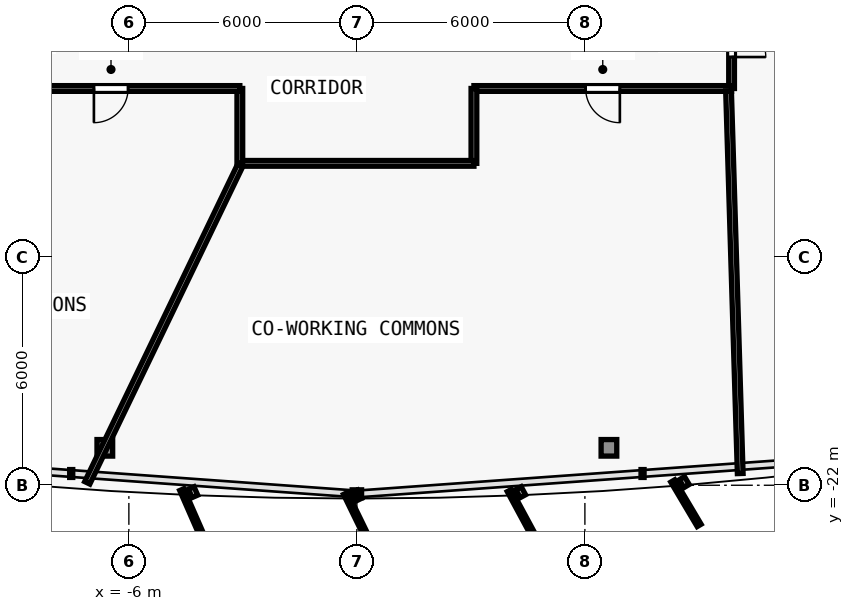
"""IFC4 building model, lengths in metres.
Left out: names, types, materials, properties, quantities, classifications, styles, units other than length and angle.
Written with IfcOpenShell. Run it as: python <this file> out.ifc"""

import sys

from ifc_helpers import new_model, si_unit, direction, frame, frame_2d, origin, origin_2d, place, context, subcontext, project, spatial, rectangle, i_section, extrude, element, fill, save


model = new_model("IFC4")
c1 = context("Model", 3, precision=1e-05, world=origin(), true_north=direction((0.0, 1.0)))
c2 = subcontext(c1, "Body", "Model", "MODEL_VIEW")
j1 = project(units=[si_unit("LENGTHUNIT", "METRE"), si_unit("PLANEANGLEUNIT", "RADIAN")], contexts=[c1])
p1 = place(None, origin())
s1 = spatial("IfcSite", under=j1, at=p1, CompositionType="ELEMENT")
p2 = place(p1, origin())
s2 = spatial("IfcBuilding", under=s1, at=p2, CompositionType="ELEMENT")
p3 = place(p2, frame((0.0, 0.0, 55.2)))
s3 = spatial("IfcBuildingStorey", under=s2, at=p3, CompositionType="ELEMENT", Elevation=55.2)
for number, where, z_axis, x_axis in (
    (1, (-6.633, -21.015, 0.006), (0.007, 0.035, 0.999), (-0.982, 0.191, 0.0)),
    (2, (6.633, -21.015, 0.006), (-0.007, 0.035, 0.999), (-0.982, -0.191, 0.0)),
):
    element("IfcColumn", number, at=place(p3, frame(where, z_axis=z_axis, x_axis=x_axis)), inside=s3, PredefinedType="COLUMN", context=c2, shape_type="SweptSolid", body=[
        extrude(i_section(OverallWidth=0.412, OverallDepth=0.435, WebThickness=0.023, FlangeThickness=0.037, FilletRadius=0.015, at=origin_2d()), origin(), (0.0, 0.0, 1.0), 3.591),
    ])
p4 = place(p3, frame((9.86, 8.426, 0.0), z_axis=(0.0, 0.0, 1.0), x_axis=(0.0, -1.0, 0.0)))
e3 = element("IfcWall", 3, at=p4, inside=s3, PredefinedType="PARTITIONING", context=c2, shape_type="SweptSolid", body=[
    extrude(rectangle(XDim=19.986, YDim=0.15, at=frame_2d((9.993, 0.0))), origin(), (0.0, 0.0, 1.0), 2.609),
])
p5 = place(p4, frame((18.258, 0.0, 0.0)))
e4 = element("IfcOpeningElement", 4, at=p5, cuts=e3, PredefinedType="OPENING", context=c2, shape_type="SweptSolid", body=[
    extrude(rectangle(XDim=0.9, YDim=2.1, at=frame_2d((0.45, 1.05))), frame((0.0, 0.085, 0.0), z_axis=(0.0, -1.0, 0.0), x_axis=(1.0, 0.0, 0.0)), (0.0, 0.0, 1.0), 0.17),
])
p6 = place(p4, frame((15.536, 0.0, 0.0)))
e5 = element("IfcOpeningElement", 5, at=p6, cuts=e3, PredefinedType="OPENING", context=c2, shape_type="SweptSolid", body=[
    extrude(rectangle(XDim=0.9, YDim=2.1, at=frame_2d((0.45, 1.05))), frame((0.0, 0.085, 0.0), z_axis=(0.0, -1.0, 0.0), x_axis=(1.0, 0.0, 0.0)), (0.0, 0.0, 1.0), 0.17),
])
p7 = place(p4, frame((12.361, 0.0, 0.0)))
e6 = element("IfcOpeningElement", 6, at=p7, cuts=e3, PredefinedType="OPENING", context=c2, shape_type="SweptSolid", body=[
    extrude(rectangle(XDim=0.9, YDim=2.1, at=frame_2d((0.45, 1.05))), frame((0.0, 0.085, 0.0), z_axis=(0.0, -1.0, 0.0), x_axis=(1.0, 0.0, 0.0)), (0.0, 0.0, 1.0), 0.17),
])
p8 = place(p4, frame((9.221, 0.0, 0.0)))
e7 = element("IfcOpeningElement", 7, at=p8, cuts=e3, PredefinedType="OPENING", context=c2, shape_type="SweptSolid", body=[
    extrude(rectangle(XDim=0.9, YDim=2.1, at=frame_2d((0.45, 1.05))), frame((0.0, 0.085, 0.0), z_axis=(0.0, -1.0, 0.0), x_axis=(1.0, 0.0, 0.0)), (0.0, 0.0, 1.0), 0.17),
])
p9 = place(p4, frame((6.557, 0.0, 0.0)))
e8 = element("IfcOpeningElement", 8, at=p9, cuts=e3, PredefinedType="OPENING", context=c2, shape_type="SweptSolid", body=[
    extrude(rectangle(XDim=0.9, YDim=2.1, at=frame_2d((0.45, 1.05))), frame((0.0, 0.085, 0.0), z_axis=(0.0, -1.0, 0.0), x_axis=(1.0, 0.0, 0.0)), (0.0, 0.0, 1.0), 0.17),
])
p10 = place(p4, frame((3.946, 0.0, 0.0)))
e9 = element("IfcOpeningElement", 9, at=p10, cuts=e3, PredefinedType="OPENING", context=c2, shape_type="SweptSolid", body=[
    extrude(rectangle(XDim=0.9, YDim=2.1, at=frame_2d((0.45, 1.05))), frame((0.0, 0.085, 0.0), z_axis=(0.0, -1.0, 0.0), x_axis=(1.0, 0.0, 0.0)), (0.0, 0.0, 1.0), 0.17),
])
p11 = place(p4, frame((1.069, 0.0, 0.0)))
e10 = element("IfcOpeningElement", 10, at=p11, cuts=e3, PredefinedType="OPENING", context=c2, shape_type="SweptSolid", body=[
    extrude(rectangle(XDim=0.9, YDim=2.1, at=frame_2d((0.45, 1.05))), frame((0.0, 0.085, 0.0), z_axis=(0.0, -1.0, 0.0), x_axis=(1.0, 0.0, 0.0)), (0.0, 0.0, 1.0), 0.17),
])
p12 = place(p3, frame((9.86, -11.56, 0.0), z_axis=(0.0, 0.0, 1.0), x_axis=(-1.0, 0.0, 0.0)))
e11 = element("IfcWall", 11, at=p12, inside=s3, PredefinedType="PARTITIONING", context=c2, shape_type="SweptSolid", body=[
    extrude(rectangle(XDim=6.78, YDim=0.15, at=frame_2d((3.39, 0.0))), origin(), (0.0, 0.0, 1.0), 3.35),
])
p13 = place(p12, frame((2.94, 0.0, 0.0)))
e12 = element("IfcOpeningElement", 12, at=p13, cuts=e11, PredefinedType="OPENING", context=c2, shape_type="SweptSolid", body=[
    extrude(rectangle(XDim=0.9, YDim=2.1, at=frame_2d((0.45, 1.05))), frame((0.0, 0.085, 0.0), z_axis=(0.0, -1.0, 0.0), x_axis=(1.0, 0.0, 0.0)), (0.0, 0.0, 1.0), 0.17),
])
p14 = place(p3, frame((3.08, -11.56, 0.0), z_axis=(0.0, 0.0, 1.0), x_axis=(0.0, -1.0, 0.0)))
e13 = element("IfcWall", 13, at=p14, inside=s3, PredefinedType="PARTITIONING", context=c2, shape_type="SweptSolid", body=[
    extrude(rectangle(XDim=1.97, YDim=0.15, at=frame_2d((0.985, 0.0))), origin(), (0.0, 0.0, 1.0), 2.775),
])
p15 = place(p3, frame((3.08, -13.53, 0.0), z_axis=(0.0, 0.0, 1.0), x_axis=(-1.0, 0.0, 0.0)))
e14 = element("IfcWall", 14, at=p15, inside=s3, PredefinedType="PARTITIONING", context=c2, shape_type="SweptSolid", body=[
    extrude(rectangle(XDim=6.16, YDim=0.15, at=frame_2d((3.08, 0.0))), origin(), (0.0, 0.0, 1.0), 2.725),
])
p16 = place(p3, frame((-3.08, -13.53, 0.0), z_axis=(0.0, 0.0, 1.0), x_axis=(0.0, 1.0, 0.0)))
e15 = element("IfcWall", 15, at=p16, inside=s3, PredefinedType="PARTITIONING", context=c2, shape_type="SweptSolid", body=[
    extrude(rectangle(XDim=1.97, YDim=0.15, at=frame_2d((0.985, 0.0))), origin(), (0.0, 0.0, 1.0), 3.025),
])
p17 = place(p3, frame((-3.08, -11.56, 0.0), z_axis=(0.0, 0.0, 1.0), x_axis=(-1.0, 0.0, 0.0)))
e16 = element("IfcWall", 16, at=p17, inside=s3, PredefinedType="PARTITIONING", context=c2, shape_type="SweptSolid", body=[
    extrude(rectangle(XDim=6.78, YDim=0.15, at=frame_2d((3.39, 0.0))), origin(), (0.0, 0.0, 1.0), 3.35),
])
p18 = place(p17, frame((2.94, 0.0, 0.0)))
e17 = element("IfcOpeningElement", 17, at=p18, cuts=e16, PredefinedType="OPENING", context=c2, shape_type="SweptSolid", body=[
    extrude(rectangle(XDim=0.9, YDim=2.1, at=frame_2d((0.45, 1.05))), frame((0.0, 0.085, 0.0), z_axis=(0.0, -1.0, 0.0), x_axis=(1.0, 0.0, 0.0)), (0.0, 0.0, 1.0), 0.17),
])
p19 = place(p3, frame((-3.066, -13.573, 0.0), z_axis=(0.0, 0.0, 1.0), x_axis=(-0.43397297164, -0.90092589034, 0.0)))
e18 = element("IfcWall", 18, at=p19, inside=s3, PredefinedType="PARTITIONING", context=c2, shape_type="SweptSolid", body=[
    extrude(rectangle(XDim=9.283, YDim=0.15, at=frame_2d((4.642, 0.0))), origin(), (0.0, 0.0, 1.0), 2.725),
])
p20 = place(p3, frame((9.78, -11.62, 0.0), z_axis=(0.0, 0.0, 1.0), x_axis=(0.030506267256, -0.999534575519, 0.0)))
e19 = element("IfcWall", 19, at=p20, inside=s3, PredefinedType="PARTITIONING", context=c2, shape_type="SweptSolid", body=[
    extrude(rectangle(XDim=10.076, YDim=0.15, at=frame_2d((5.038, 0.0))), origin(), (0.0, 0.0, 1.0), 2.725),
])
p21 = place(p18, origin())
e20 = element("IfcDoor", 20, at=p21, inside=s3, OperationType="SINGLE_SWING_RIGHT", PredefinedType="DOOR", context=c2, shape_type="SweptSolid", body=[
    extrude(rectangle(XDim=0.9, YDim=2.1, at=frame_2d((0.45, 1.05))), frame((0.0, 0.025, 0.0), z_axis=(0.0, -1.0, 0.0), x_axis=(1.0, 0.0, 0.0)), (0.0, 0.0, 1.0), 0.05),
])
fill(e17, e20)
p22 = place(p13, origin())
e21 = element("IfcDoor", 21, at=p22, inside=s3, OperationType="SINGLE_SWING_LEFT", PredefinedType="DOOR", context=c2, shape_type="SweptSolid", body=[
    extrude(rectangle(XDim=0.9, YDim=2.1, at=frame_2d((0.45, 1.05))), frame((0.0, 0.025, 0.0), z_axis=(0.0, -1.0, 0.0), x_axis=(1.0, 0.0, 0.0)), (0.0, 0.0, 1.0), 0.05),
])
fill(e12, e21)
p23 = place(p5, origin())
e22 = element("IfcDoor", 22, at=p23, inside=s3, OperationType="SINGLE_SWING_RIGHT", PredefinedType="DOOR", context=c2, shape_type="SweptSolid", body=[
    extrude(rectangle(XDim=0.9, YDim=2.1, at=frame_2d((0.45, 1.05))), frame((0.0, 0.025, 0.0), z_axis=(0.0, -1.0, 0.0), x_axis=(1.0, 0.0, 0.0)), (0.0, 0.0, 1.0), 0.05),
])
fill(e4, e22)
save(model, sys.argv[1])
